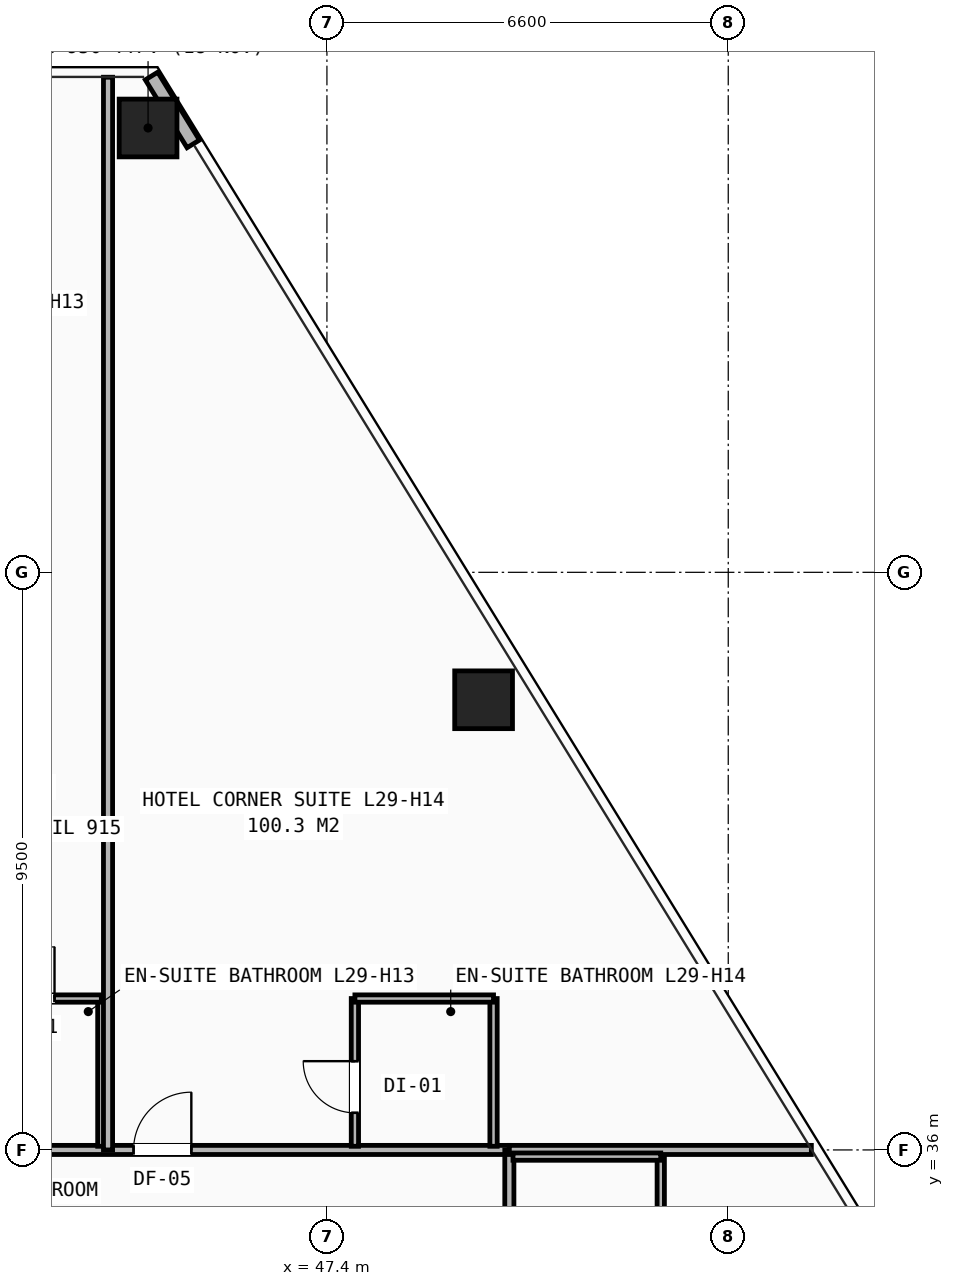
"""IFC4 building model, lengths in metres.
Left out: names, types, materials, properties, quantities, classifications, styles, units other than length and angle.
Written with IfcOpenShell. Run it as: python <this file> out.ifc"""

import sys

from ifc_helpers import new_model, si_unit, direction, frame, frame_2d, origin, origin_2d, place, context, subcontext, project, spatial, rectangle, hollow_rectangle, extrude, element, fill, save


model = new_model("IFC4")
c1 = context("Model", 3, precision=1e-05, world=origin(), true_north=direction((0.0, 1.0)))
c2 = subcontext(c1, "Body", "Model", "MODEL_VIEW")
j1 = project(units=[si_unit("LENGTHUNIT", "METRE"), si_unit("PLANEANGLEUNIT", "RADIAN")], contexts=[c1])
p1 = place(None, origin())
s1 = spatial("IfcSite", under=j1, at=p1, CompositionType="ELEMENT")
p2 = place(p1, origin())
s2 = spatial("IfcBuilding", under=s1, at=p2, CompositionType="ELEMENT")
p3 = place(p2, frame((0.0, 0.0, 102.2)))
s3 = spatial("IfcBuildingStorey", under=s2, at=p3, CompositionType="ELEMENT", Elevation=102.2)
for number, where, z_axis, x_axis in (
    (1, (44.458, 52.808, 0.0), (0.0, 0.0, 1.0), (1.0, 0.0, 0.0)),
    (2, (49.977, 43.404, 0.0), (0.0, 0.0, 1.0), (1.0, 0.0, 0.0)),
):
    element("IfcColumn", number, at=place(p3, frame(where, z_axis=z_axis, x_axis=x_axis)), inside=s3, PredefinedType="COLUMN", context=c2, shape_type="SweptSolid", body=[
        extrude(hollow_rectangle(XDim=0.95, YDim=0.95, WallThickness=0.065, at=origin_2d()), origin(), (0.0, 0.0, 1.0), 3.2),
    ])
p4 = place(p3, frame((45.202, 52.546, 0.0), z_axis=(0.0, 0.0, 1.0), x_axis=(-0.523671203533, 0.851920460248, 0.0)))
e3 = element("IfcWall", 3, at=p4, inside=s3, PredefinedType="SHEAR", context=c2, shape_type="SweptSolid", body=[
    extrude(rectangle(XDim=1.311, YDim=0.24, at=frame_2d((0.655, 0.0))), origin(), (0.0, 0.0, 1.0), 2.253),
])
p5 = place(p3, frame((40.75, 36.0, 0.0), z_axis=(0.0, 0.0, 1.0), x_axis=(1.0, 0.0, 0.0)))
e4 = element("IfcWall", 4, at=p5, inside=s3, PredefinedType="PARTITIONING", context=c2, shape_type="SweptSolid", body=[
    extrude(rectangle(XDim=9.65, YDim=0.15, at=frame_2d((4.825, 0.0))), origin(), (0.0, 0.0, 1.0), 2.503),
])
p6 = place(p5, frame((3.47, 0.0, 0.0)))
e5 = element("IfcOpeningElement", 5, at=p6, cuts=e4, PredefinedType="OPENING", context=c2, shape_type="SweptSolid", body=[
    extrude(rectangle(XDim=0.95, YDim=2.1, at=frame_2d((0.475, 1.05))), frame((0.0, 0.085, 0.0), z_axis=(0.0, -1.0, 0.0), x_axis=(1.0, 0.0, 0.0)), (0.0, 0.0, 1.0), 0.17),
])
p7 = place(p3, frame((50.4, 14.1, 0.0), z_axis=(0.0, 0.0, 1.0), x_axis=(0.0, 1.0, 0.0)))
e6 = element("IfcWall", 6, at=p7, inside=s3, PredefinedType="PARTITIONING", context=c2, shape_type="SweptSolid", body=[
    extrude(rectangle(XDim=21.9, YDim=0.15, at=frame_2d((10.95, 0.0))), origin(), (0.0, 0.0, 1.0), 2.421),
])
p8 = place(p7, frame((0.42, 0.0, 0.0)))
e7 = element("IfcOpeningElement", 7, at=p8, cuts=e6, PredefinedType="OPENING", context=c2, shape_type="SweptSolid", body=[
    extrude(rectangle(XDim=0.95, YDim=2.1, at=frame_2d((0.475, 1.05))), frame((0.0, 0.085, 0.0), z_axis=(0.0, -1.0, 0.0), x_axis=(1.0, 0.0, 0.0)), (0.0, 0.0, 1.0), 0.17),
])
p9 = place(p7, frame((5.52, 0.0, 0.0)))
e8 = element("IfcOpeningElement", 8, at=p9, cuts=e6, PredefinedType="OPENING", context=c2, shape_type="SweptSolid", body=[
    extrude(rectangle(XDim=0.95, YDim=2.1, at=frame_2d((0.475, 1.05))), frame((0.0, 0.085, 0.0), z_axis=(0.0, -1.0, 0.0), x_axis=(1.0, 0.0, 0.0)), (0.0, 0.0, 1.0), 0.17),
])
p10 = place(p7, frame((10.92, 0.0, 0.0)))
e9 = element("IfcOpeningElement", 9, at=p10, cuts=e6, PredefinedType="OPENING", context=c2, shape_type="SweptSolid", body=[
    extrude(rectangle(XDim=0.95, YDim=2.1, at=frame_2d((0.475, 1.05))), frame((0.0, 0.085, 0.0), z_axis=(0.0, -1.0, 0.0), x_axis=(1.0, 0.0, 0.0)), (0.0, 0.0, 1.0), 0.17),
])
p11 = place(p7, frame((16.72, 0.0, 0.0)))
e10 = element("IfcOpeningElement", 10, at=p11, cuts=e6, PredefinedType="OPENING", context=c2, shape_type="SweptSolid", body=[
    extrude(rectangle(XDim=0.95, YDim=2.1, at=frame_2d((0.475, 1.05))), frame((0.0, 0.085, 0.0), z_axis=(0.0, -1.0, 0.0), x_axis=(1.0, 0.0, 0.0)), (0.0, 0.0, 1.0), 0.17),
])
p12 = place(p3, frame((50.4, 36.0, 0.0), z_axis=(0.0, 0.0, 1.0), x_axis=(1.0, 0.0, 0.0)))
e11 = element("IfcWall", 11, at=p12, inside=s3, PredefinedType="PARTITIONING", context=c2, shape_type="SweptSolid", body=[
    extrude(rectangle(XDim=4.967, YDim=0.15, at=frame_2d((2.483, 0.0))), origin(), (0.0, 0.0, 1.0), 2.258),
])
p13 = place(p3, frame((52.89, 33.61, 0.0), z_axis=(0.0, 0.0, 1.0), x_axis=(0.0, 1.0, 0.0)))
e12 = element("IfcWall", 12, at=p13, inside=s3, PredefinedType="PARTITIONING", context=c2, shape_type="SweptSolid", body=[
    extrude(rectangle(XDim=2.28, YDim=0.12, at=frame_2d((1.14, 0.0))), origin(), (0.0, 0.0, 1.0), 2.97),
])
for number, where, z_axis, x_axis in (
    (13, (50.46, 35.89, 0.0), (0.0, 0.0, 1.0), (1.0, 0.0, 0.0)),
    (14, (43.69, 36.06, 0.0), (0.0, 0.0, 1.0), (0.0, 1.0, 0.0)),
):
    element("IfcWall", number, at=place(p3, frame(where, z_axis=z_axis, x_axis=x_axis)), inside=s3, PredefinedType="PARTITIONING", context=c2, shape_type="SweptSolid", body=[
        extrude(rectangle(XDim=2.43, YDim=0.12, at=frame_2d((1.215, 0.0))), origin(), (0.0, 0.0, 1.0), 2.97),
    ])
p14 = place(p3, frame((41.95, 38.49, 0.0), z_axis=(0.0, 0.0, 1.0), x_axis=(1.0, 0.0, 0.0)))
e15 = element("IfcWall", 15, at=p14, inside=s3, PredefinedType="PARTITIONING", context=c2, shape_type="SweptSolid", body=[
    extrude(rectangle(XDim=1.74, YDim=0.12, at=frame_2d((0.87, 0.0))), origin(), (0.0, 0.0, 1.0), 2.97),
])
p15 = place(p14, frame((0.12, 0.0, 0.0)))
e16 = element("IfcOpeningElement", 16, at=p15, cuts=e15, PredefinedType="OPENING", context=c2, shape_type="SweptSolid", body=[
    extrude(rectangle(XDim=0.85, YDim=2.05, at=frame_2d((0.425, 1.025))), frame((0.0, 0.07, 0.0), z_axis=(0.0, -1.0, 0.0), x_axis=(1.0, 0.0, 0.0)), (0.0, 0.0, 1.0), 0.14),
])
p16 = place(p3, frame((43.8, 36.0, 0.0), z_axis=(0.0, 0.0, 1.0), x_axis=(0.0, 1.0, 0.0)))
e17 = element("IfcWall", 17, at=p16, inside=s3, PredefinedType="PARTITIONING", context=c2, shape_type="SweptSolid", body=[
    extrude(rectangle(XDim=17.643, YDim=0.15, at=frame_2d((8.821, 0.0))), origin(), (0.0, 0.0, 1.0), 2.258),
])
p17 = place(p3, frame((47.86, 36.06, 0.0), z_axis=(0.0, 0.0, 1.0), x_axis=(0.0, 1.0, 0.0)))
e18 = element("IfcWall", 18, at=p17, inside=s3, PredefinedType="PARTITIONING", context=c2, shape_type="SweptSolid", body=[
    extrude(rectangle(XDim=2.43, YDim=0.12, at=frame_2d((1.215, 0.0))), origin(), (0.0, 0.0, 1.0), 2.503),
])
p18 = place(p17, frame((0.55, 0.0, 0.0)))
e19 = element("IfcOpeningElement", 19, at=p18, cuts=e18, PredefinedType="OPENING", context=c2, shape_type="SweptSolid", body=[
    extrude(rectangle(XDim=0.85, YDim=2.05, at=frame_2d((0.425, 1.025))), frame((0.0, 0.07, 0.0), z_axis=(0.0, -1.0, 0.0), x_axis=(1.0, 0.0, 0.0)), (0.0, 0.0, 1.0), 0.14),
])
p19 = place(p3, frame((50.14, 36.06, 0.0), z_axis=(0.0, 0.0, 1.0), x_axis=(0.0, 1.0, 0.0)))
e20 = element("IfcWall", 20, at=p19, inside=s3, PredefinedType="PARTITIONING", context=c2, shape_type="SweptSolid", body=[
    extrude(rectangle(XDim=2.43, YDim=0.12, at=frame_2d((1.215, 0.0))), origin(), (0.0, 0.0, 1.0), 2.97),
])
p20 = place(p3, frame((47.86, 38.49, 0.0), z_axis=(0.0, 0.0, 1.0), x_axis=(1.0, 0.0, 0.0)))
e21 = element("IfcWall", 21, at=p20, inside=s3, PredefinedType="PARTITIONING", context=c2, shape_type="SweptSolid", body=[
    extrude(rectangle(XDim=2.28, YDim=0.12, at=frame_2d((1.14, 0.0))), origin(), (0.0, 0.0, 1.0), 2.503),
])
p21 = place(p15, origin())
e22 = element("IfcDoor", 22, at=p21, inside=s3, OperationType="SINGLE_SWING_RIGHT", PredefinedType="DOOR", context=c2, shape_type="SweptSolid", body=[
    extrude(rectangle(XDim=0.85, YDim=2.05, at=frame_2d((0.425, 1.025))), frame((0.0, 0.025, 0.0), z_axis=(0.0, -1.0, 0.0), x_axis=(1.0, 0.0, 0.0)), (0.0, 0.0, 1.0), 0.05),
])
fill(e16, e22)
p22 = place(p6, origin())
e23 = element("IfcDoor", 23, at=p22, inside=s3, OperationType="SINGLE_SWING_RIGHT", PredefinedType="DOOR", context=c2, shape_type="SweptSolid", body=[
    extrude(rectangle(XDim=0.95, YDim=2.1, at=frame_2d((0.475, 1.05))), frame((0.0, 0.025, 0.0), z_axis=(0.0, -1.0, 0.0), x_axis=(1.0, 0.0, 0.0)), (0.0, 0.0, 1.0), 0.05),
])
fill(e5, e23)
p23 = place(p18, origin())
e24 = element("IfcDoor", 24, at=p23, inside=s3, OperationType="SINGLE_SWING_RIGHT", PredefinedType="DOOR", context=c2, shape_type="SweptSolid", body=[
    extrude(rectangle(XDim=0.85, YDim=2.05, at=frame_2d((0.425, 1.025))), frame((0.0, 0.025, 0.0), z_axis=(0.0, -1.0, 0.0), x_axis=(1.0, 0.0, 0.0)), (0.0, 0.0, 1.0), 0.05),
])
fill(e19, e24)
save(model, sys.argv[1])
